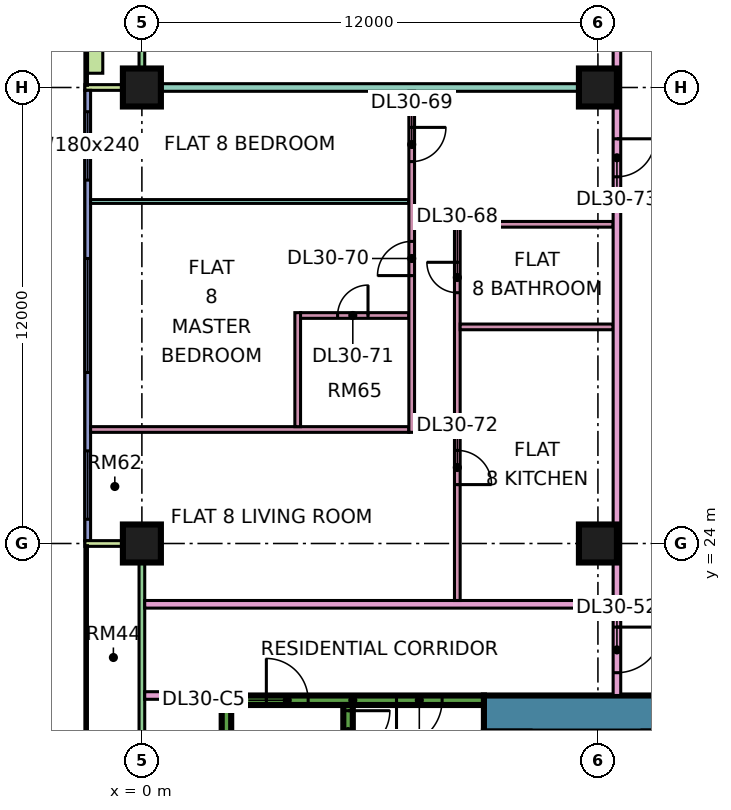
"""IFC4 building model, lengths in metres.
Left out: names, types, materials, properties, quantities, classifications, styles, units other than length and angle.
Written with IfcOpenShell. Run it as: python <this file> out.ifc"""

import sys

from ifc_helpers import new_model, si_unit, direction, frame, frame_2d, origin, origin_2d, place, context, subcontext, project, spatial, rectangle, extrude, element, fill, save


model = new_model("IFC4")
c1 = context("Model", 3, precision=1e-05, world=origin(), true_north=direction((0.0, 1.0)))
c2 = subcontext(c1, "Body", "Model", "MODEL_VIEW")
j1 = project(units=[si_unit("LENGTHUNIT", "METRE"), si_unit("PLANEANGLEUNIT", "RADIAN")], contexts=[c1])
p1 = place(None, origin())
s1 = spatial("IfcSite", under=j1, at=p1, CompositionType="ELEMENT")
p2 = place(p1, origin())
s2 = spatial("IfcBuilding", under=s1, at=p2, CompositionType="ELEMENT")
p3 = place(p2, frame((0.0, 0.0, 129.4)))
s3 = spatial("IfcBuildingStorey", under=s2, at=p3, CompositionType="ELEMENT", Elevation=129.4)
p4 = place(p3, frame((0.0, 24.0, 0.0), z_axis=(0.0, 0.0, 1.0), x_axis=(1.0, 0.0, 0.0)))
e1 = element("IfcColumn", 1, at=p4, inside=s3, PredefinedType="COLUMN", context=c2, shape_type="SweptSolid", body=[
    extrude(rectangle(XDim=1.0, YDim=1.0, at=origin_2d()), origin(), (0.0, 0.0, 1.0), 3.75),
])
p5 = place(p3, frame((0.0, 36.0, 0.0), z_axis=(0.0, 0.0, 1.0), x_axis=(1.0, 0.0, 0.0)))
e2 = element("IfcColumn", 2, at=p5, inside=s3, PredefinedType="COLUMN", context=c2, shape_type="SweptSolid", body=[
    extrude(rectangle(XDim=1.0, YDim=1.0, at=origin_2d()), origin(), (0.0, 0.0, 1.0), 3.75),
])
for number, where, z_axis, x_axis in (
    (3, (12.0, 24.0, 0.0), (0.0, 0.0, 1.0), (1.0, 0.0, 0.0)),
    (4, (12.0, 36.0, 0.0), (0.0, 0.0, 1.0), (1.0, 0.0, 0.0)),
):
    element("IfcColumn", number, at=place(p3, frame(where, z_axis=z_axis, x_axis=x_axis)), inside=s3, PredefinedType="COLUMN", context=c2, shape_type="SweptSolid", body=[
        extrude(rectangle(XDim=1.0, YDim=1.0, at=origin_2d()), origin(), (0.0, 0.0, 1.0), 3.75),
    ])
p6 = place(p3, frame((9.0, 19.525, 0.0), z_axis=(0.0, 0.0, 1.0), x_axis=(1.0, 0.0, 0.0)))
e5 = element("IfcWall", 5, at=p6, inside=s3, PredefinedType="SHEAR", context=c2, shape_type="SweptSolid", body=[
    extrude(rectangle(XDim=25.0, YDim=0.95, at=frame_2d((12.5, 0.0))), origin(), (0.0, 0.0, 1.0), 3.75),
])
p7 = place(p6, frame((19.1, 0.0, 0.0)))
e6 = element("IfcOpeningElement", 6, at=p7, cuts=e5, PredefinedType="OPENING", context=c2, shape_type="SweptSolid", body=[
    extrude(rectangle(XDim=1.8, YDim=2.4, at=frame_2d((0.9, 1.2))), frame((0.0, 0.485, 0.0), z_axis=(0.0, -1.0, 0.0), x_axis=(1.0, 0.0, 0.0)), (0.0, 0.0, 1.0), 0.97),
])
p8 = place(p3, frame((2.1, 19.875, 0.0), z_axis=(0.0, 0.0, 1.0), x_axis=(1.0, 0.0, 0.0)))
e7 = element("IfcWall", 7, at=p8, inside=s3, PredefinedType="SHEAR", context=c2, shape_type="SweptSolid", body=[
    extrude(rectangle(XDim=6.9, YDim=0.25, at=frame_2d((3.45, 0.0))), origin(), (0.0, 0.0, 1.0), 3.75),
])
p9 = place(p8, frame((1.175, 0.0, 0.0)))
e8 = element("IfcOpeningElement", 8, at=p9, cuts=e7, PredefinedType="OPENING", context=c2, shape_type="SweptSolid", body=[
    extrude(rectangle(XDim=1.1, YDim=2.2, at=frame_2d((0.55, 1.1))), frame((0.0, 0.135, 0.0), z_axis=(0.0, -1.0, 0.0), x_axis=(1.0, 0.0, 0.0)), (0.0, 0.0, 1.0), 0.27),
])
p10 = place(p8, frame((4.6, 0.0, 0.0)))
e9 = element("IfcOpeningElement", 9, at=p10, cuts=e7, PredefinedType="OPENING", context=c2, shape_type="SweptSolid", body=[
    extrude(rectangle(XDim=1.2, YDim=2.2, at=frame_2d((0.6, 1.1))), frame((0.0, 0.135, 0.0), z_axis=(0.0, -1.0, 0.0), x_axis=(1.0, 0.0, 0.0)), (0.0, 0.0, 1.0), 0.27),
])
p11 = place(p3, frame((2.225, 13.25, 0.0), z_axis=(0.0, 0.0, 1.0), x_axis=(0.0, 1.0, 0.0)))
e10 = element("IfcWall", 10, at=p11, inside=s3, PredefinedType="SHEAR", context=c2, shape_type="SweptSolid", body=[
    extrude(rectangle(XDim=6.5, YDim=0.25, at=frame_2d((3.25, 0.0))), origin(), (0.0, 0.0, 1.0), 3.75),
])
p12 = place(p3, frame((5.425, 13.25, 0.0), z_axis=(0.0, 0.0, 1.0), x_axis=(0.0, 1.0, 0.0)))
e11 = element("IfcWall", 11, at=p12, inside=s3, PredefinedType="SHEAR", context=c2, shape_type="SweptSolid", body=[
    extrude(rectangle(XDim=6.5, YDim=0.25, at=frame_2d((3.25, 0.0))), origin(), (0.0, 0.0, 1.0), 3.75),
])
p13 = place(p12, frame((5.25, 0.0, 0.0)))
e12 = element("IfcOpeningElement", 12, at=p13, cuts=e11, PredefinedType="OPENING", context=c2, shape_type="SweptSolid", body=[
    extrude(rectangle(XDim=1.1, YDim=2.2, at=frame_2d((0.55, 1.1))), frame((0.0, 0.135, 0.0), z_axis=(0.0, -1.0, 0.0), x_axis=(1.0, 0.0, 0.0)), (0.0, 0.0, 1.0), 0.27),
])
p14 = place(p3, frame((0.0, 47.925, 0.0), z_axis=(0.0, 0.0, 1.0), x_axis=(0.0, -1.0, 0.0)))
e13 = element("IfcWall", 13, at=p14, inside=s3, PredefinedType="SOLIDWALL", context=c2, shape_type="SweptSolid", body=[
    extrude(rectangle(XDim=11.85, YDim=0.15, at=frame_2d((5.925, 0.0))), origin(), (0.0, 0.0, 1.0), 3.35),
])
p15 = place(p14, frame((0.562, 0.0, 0.45)))
e14 = element("IfcOpeningElement", 14, at=p15, cuts=e13, PredefinedType="OPENING", context=c2, shape_type="SweptSolid", body=[
    extrude(rectangle(XDim=1.2, YDim=2.4, at=frame_2d((0.6, 1.2))), frame((0.0, 0.085, 0.0), z_axis=(0.0, -1.0, 0.0), x_axis=(1.0, 0.0, 0.0)), (0.0, 0.0, 1.0), 0.17),
])
p16 = place(p14, frame((4.125, 0.0, 0.0)))
e15 = element("IfcOpeningElement", 15, at=p16, cuts=e13, PredefinedType="OPENING", context=c2, shape_type="SweptSolid", body=[
    extrude(rectangle(XDim=1.2, YDim=2.4, at=frame_2d((0.6, 1.2))), frame((0.0, 0.085, 0.0), z_axis=(0.0, -1.0, 0.0), x_axis=(1.0, 0.0, 0.0)), (0.0, 0.0, 1.0), 0.17),
])
p17 = place(p14, frame((7.125, 0.0, 0.45)))
e16 = element("IfcOpeningElement", 16, at=p17, cuts=e13, PredefinedType="OPENING", context=c2, shape_type="SweptSolid", body=[
    extrude(rectangle(XDim=3.0, YDim=2.4, at=frame_2d((1.5, 1.2))), frame((0.0, 0.085, 0.0), z_axis=(0.0, -1.0, 0.0), x_axis=(1.0, 0.0, 0.0)), (0.0, 0.0, 1.0), 0.17),
])
p18 = place(p3, frame((-1.5, 36.0, 0.0), z_axis=(0.0, 0.0, 1.0), x_axis=(1.0, 0.0, 0.0)))
e17 = element("IfcWall", 17, at=p18, inside=s3, PredefinedType="SOLIDWALL", context=c2, shape_type="SweptSolid", body=[
    extrude(rectangle(XDim=1.5, YDim=0.15, at=frame_2d((0.75, 0.0))), origin(), (0.0, 0.0, 1.0), 3.35),
])
p19 = place(p3, frame((-1.425, 35.925, 0.0), z_axis=(0.0, 0.0, 1.0), x_axis=(0.0, -1.0, 0.0)))
e18 = element("IfcWall", 18, at=p19, inside=s3, PredefinedType="SOLIDWALL", context=c2, shape_type="SweptSolid", body=[
    extrude(rectangle(XDim=11.85, YDim=0.15, at=frame_2d((5.925, 0.0))), origin(), (0.0, 0.0, 1.0), 3.35),
])
p20 = place(p19, frame((0.562, 0.0, 0.45)))
e19 = element("IfcOpeningElement", 19, at=p20, cuts=e18, PredefinedType="OPENING", context=c2, shape_type="SweptSolid", body=[
    extrude(rectangle(XDim=1.8, YDim=2.4, at=frame_2d((0.9, 1.2))), frame((0.0, 0.085, 0.0), z_axis=(0.0, -1.0, 0.0), x_axis=(1.0, 0.0, 0.0)), (0.0, 0.0, 1.0), 0.17),
])
p21 = place(p19, frame((4.425, 0.0, 0.45)))
e20 = element("IfcOpeningElement", 20, at=p21, cuts=e18, PredefinedType="OPENING", context=c2, shape_type="SweptSolid", body=[
    extrude(rectangle(XDim=3.0, YDim=2.4, at=frame_2d((1.5, 1.2))), frame((0.0, 0.085, 0.0), z_axis=(0.0, -1.0, 0.0), x_axis=(1.0, 0.0, 0.0)), (0.0, 0.0, 1.0), 0.17),
])
p22 = place(p19, frame((9.488, 0.0, 0.45)))
e21 = element("IfcOpeningElement", 21, at=p22, cuts=e18, PredefinedType="OPENING", context=c2, shape_type="SweptSolid", body=[
    extrude(rectangle(XDim=1.8, YDim=2.4, at=frame_2d((0.9, 1.2))), frame((0.0, 0.085, 0.0), z_axis=(0.0, -1.0, 0.0), x_axis=(1.0, 0.0, 0.0)), (0.0, 0.0, 1.0), 0.17),
])
p23 = place(p3, frame((0.0, 23.925, 0.0), z_axis=(0.0, 0.0, 1.0), x_axis=(0.0, -1.0, 0.0)))
e22 = element("IfcWall", 22, at=p23, inside=s3, PredefinedType="SOLIDWALL", context=c2, shape_type="SweptSolid", body=[
    extrude(rectangle(XDim=11.35, YDim=0.15, at=frame_2d((5.675, 0.0))), origin(), (0.0, 0.0, 1.0), 3.35),
])
p24 = place(p23, frame((6.738, 0.0, 0.0)))
e23 = element("IfcOpeningElement", 23, at=p24, cuts=e22, PredefinedType="OPENING", context=c2, shape_type="SweptSolid", body=[
    extrude(rectangle(XDim=1.8, YDim=2.4, at=frame_2d((0.9, 1.2))), frame((0.0, 0.085, 0.0), z_axis=(0.0, -1.0, 0.0), x_axis=(1.0, 0.0, 0.0)), (0.0, 0.0, 1.0), 0.17),
])
p25 = place(p3, frame((-1.5, 24.0, 0.0), z_axis=(0.0, 0.0, 1.0), x_axis=(1.0, 0.0, 0.0)))
e24 = element("IfcWall", 24, at=p25, inside=s3, PredefinedType="SOLIDWALL", context=c2, shape_type="SweptSolid", body=[
    extrude(rectangle(XDim=1.5, YDim=0.15, at=frame_2d((0.75, 0.0))), origin(), (0.0, 0.0, 1.0), 3.35),
])
p26 = place(p3, frame((-1.229, 47.625, 0.0), z_axis=(0.0, 0.0, 1.0), x_axis=(0.0, -1.0, 0.0)))
e25 = element("IfcWall", 25, at=p26, inside=s3, PredefinedType="SOLIDWALL", context=c2, shape_type="SweptSolid", body=[
    extrude(rectangle(XDim=11.25, YDim=0.4, at=frame_2d((5.625, 0.0))), origin(), (0.0, 0.0, 1.0), 0.7),
])
p27 = place(p3, frame((-1.351, 33.0, 0.0), z_axis=(0.0, 0.0, 1.0), x_axis=(1.0, 0.0, 0.0)))
e26 = element("IfcWall", 26, at=p27, inside=s3, PredefinedType="PARTITIONING", context=c2, shape_type="SweptSolid", body=[
    extrude(rectangle(XDim=8.376, YDim=0.1, at=frame_2d((4.188, 0.0))), origin(), (0.0, 0.0, 1.0), 3.35),
])
p28 = place(p3, frame((-1.35, 27.0, 0.0), z_axis=(0.0, 0.0, 1.0), x_axis=(1.0, 0.0, 0.0)))
e27 = element("IfcWall", 27, at=p28, inside=s3, PredefinedType="PARTITIONING", context=c2, shape_type="SweptSolid", body=[
    extrude(rectangle(XDim=8.375, YDim=0.15, at=frame_2d((4.188, 0.0))), origin(), (0.0, 0.0, 1.0), 3.35),
])
e28 = element("IfcWall", 28, at=p5, inside=s3, PredefinedType="PARTITIONING", context=c2, shape_type="SweptSolid", body=[
    extrude(rectangle(XDim=12.4, YDim=0.2, at=frame_2d((6.2, 0.0))), origin(), (0.0, 0.0, 1.0), 3.35),
])
p29 = place(p3, frame((0.074, 20.0, 0.0), z_axis=(0.0, 0.0, 1.0), x_axis=(1.0, 0.0, 0.0)))
e29 = element("IfcWall", 29, at=p29, inside=s3, PredefinedType="PARTITIONING", context=c2, shape_type="SweptSolid", body=[
    extrude(rectangle(XDim=2.026, YDim=0.2, at=frame_2d((1.013, 0.0))), origin(), (0.0, 0.0, 1.0), 3.35),
])
p30 = place(p3, frame((0.074, 22.4, 0.0), z_axis=(0.0, 0.0, 1.0), x_axis=(1.0, 0.0, 0.0)))
e30 = element("IfcWall", 30, at=p30, inside=s3, PredefinedType="PARTITIONING", context=c2, shape_type="SweptSolid", body=[
    extrude(rectangle(XDim=12.326, YDim=0.2, at=frame_2d((6.163, 0.0))), origin(), (0.0, 0.0, 1.0), 3.35),
])
p31 = place(p3, frame((4.1, 27.075, 0.0), z_axis=(0.0, 0.0, 1.0), x_axis=(0.0, 1.0, 0.0)))
e31 = element("IfcWall", 31, at=p31, inside=s3, PredefinedType="PARTITIONING", context=c2, shape_type="SweptSolid", body=[
    extrude(rectangle(XDim=3.0, YDim=0.15, at=frame_2d((1.5, 0.0))), origin(), (0.0, 0.0, 1.0), 3.35),
])
p32 = place(p3, frame((4.175, 30.0, 0.0), z_axis=(0.0, 0.0, 1.0), x_axis=(1.0, 0.0, 0.0)))
e32 = element("IfcWall", 32, at=p32, inside=s3, PredefinedType="PARTITIONING", context=c2, shape_type="SweptSolid", body=[
    extrude(rectangle(XDim=2.85, YDim=0.15, at=frame_2d((1.425, 0.0))), origin(), (0.0, 0.0, 1.0), 3.35),
])
p33 = place(p32, frame((0.975, 0.0, 0.0)))
e33 = element("IfcOpeningElement", 33, at=p33, cuts=e32, PredefinedType="OPENING", context=c2, shape_type="SweptSolid", body=[
    extrude(rectangle(XDim=0.8, YDim=2.1, at=frame_2d((0.4, 1.05))), frame((0.0, 0.085, 0.0), z_axis=(0.0, -1.0, 0.0), x_axis=(1.0, 0.0, 0.0)), (0.0, 0.0, 1.0), 0.17),
])
p34 = place(p3, frame((7.1, 26.925, 0.0), z_axis=(0.0, 0.0, 1.0), x_axis=(0.0, 1.0, 0.0)))
e34 = element("IfcWall", 34, at=p34, inside=s3, PredefinedType="PARTITIONING", context=c2, shape_type="SweptSolid", body=[
    extrude(rectangle(XDim=8.975, YDim=0.15, at=frame_2d((4.487, 0.0))), origin(), (0.0, 0.0, 1.0), 3.35),
])
p35 = place(p34, frame((7.125, 0.0, 0.0)))
e35 = element("IfcOpeningElement", 35, at=p35, cuts=e34, PredefinedType="OPENING", context=c2, shape_type="SweptSolid", body=[
    extrude(rectangle(XDim=0.9, YDim=2.1, at=frame_2d((0.45, 1.05))), frame((0.0, 0.085, 0.0), z_axis=(0.0, -1.0, 0.0), x_axis=(1.0, 0.0, 0.0)), (0.0, 0.0, 1.0), 0.17),
])
p36 = place(p34, frame((4.125, 0.0, 0.0)))
e36 = element("IfcOpeningElement", 36, at=p36, cuts=e34, PredefinedType="OPENING", context=c2, shape_type="SweptSolid", body=[
    extrude(rectangle(XDim=0.9, YDim=2.1, at=frame_2d((0.45, 1.05))), frame((0.0, 0.085, 0.0), z_axis=(0.0, -1.0, 0.0), x_axis=(1.0, 0.0, 0.0)), (0.0, 0.0, 1.0), 0.17),
])
p37 = place(p3, frame((8.3, 22.5, 0.0), z_axis=(0.0, 0.0, 1.0), x_axis=(0.0, 1.0, 0.0)))
e37 = element("IfcWall", 37, at=p37, inside=s3, PredefinedType="PARTITIONING", context=c2, shape_type="SweptSolid", body=[
    extrude(rectangle(XDim=9.975, YDim=0.15, at=frame_2d((4.988, 0.0))), origin(), (0.0, 0.0, 1.0), 3.35),
])
p38 = place(p37, frame((8.1, 0.0, 0.0)))
e38 = element("IfcOpeningElement", 38, at=p38, cuts=e37, PredefinedType="OPENING", context=c2, shape_type="SweptSolid", body=[
    extrude(rectangle(XDim=0.8, YDim=2.1, at=frame_2d((0.4, 1.05))), frame((0.0, 0.085, 0.0), z_axis=(0.0, -1.0, 0.0), x_axis=(1.0, 0.0, 0.0)), (0.0, 0.0, 1.0), 0.17),
])
p39 = place(p37, frame((3.05, 0.0, 0.0)))
e39 = element("IfcOpeningElement", 39, at=p39, cuts=e37, PredefinedType="OPENING", context=c2, shape_type="SweptSolid", body=[
    extrude(rectangle(XDim=0.9, YDim=2.1, at=frame_2d((0.45, 1.05))), frame((0.0, 0.085, 0.0), z_axis=(0.0, -1.0, 0.0), x_axis=(1.0, 0.0, 0.0)), (0.0, 0.0, 1.0), 0.17),
])
for number, where, z_axis, x_axis in (
    (40, (8.375, 29.7, 0.0), (0.0, 0.0, 1.0), (1.0, 0.0, 0.0)),
    (41, (8.375, 32.4, 0.0), (0.0, 0.0, 1.0), (1.0, 0.0, 0.0)),
):
    element("IfcWall", number, at=place(p3, frame(where, z_axis=z_axis, x_axis=x_axis)), inside=s3, PredefinedType="PARTITIONING", context=c2, shape_type="SweptSolid", body=[
        extrude(rectangle(XDim=4.025, YDim=0.15, at=frame_2d((2.012, 0.0))), origin(), (0.0, 0.0, 1.0), 3.35),
    ])
p40 = place(p3, frame((12.5, 20.0, 0.0), z_axis=(0.0, 0.0, 1.0), x_axis=(0.0, 1.0, 0.0)))
e42 = element("IfcWall", 42, at=p40, inside=s3, PredefinedType="PARTITIONING", context=c2, shape_type="SweptSolid", body=[
    extrude(rectangle(XDim=42.926, YDim=0.2, at=frame_2d((21.463, 0.0))), origin(), (0.0, 0.0, 1.0), 3.35),
])
p41 = place(p40, frame((17.25, 0.0, 0.0)))
e43 = element("IfcOpeningElement", 43, at=p41, cuts=e42, PredefinedType="OPENING", context=c2, shape_type="SweptSolid", body=[
    extrude(rectangle(XDim=1.0, YDim=2.1, at=frame_2d((0.5, 1.05))), frame((0.0, 0.11, 0.0), z_axis=(0.0, -1.0, 0.0), x_axis=(1.0, 0.0, 0.0)), (0.0, 0.0, 1.0), 0.22),
])
p42 = place(p40, frame((40.8, 0.0, 0.0)))
e44 = element("IfcOpeningElement", 44, at=p42, cuts=e42, PredefinedType="OPENING", context=c2, shape_type="SweptSolid", body=[
    extrude(rectangle(XDim=1.0, YDim=2.1, at=frame_2d((0.5, 1.05))), frame((0.0, 0.11, 0.0), z_axis=(0.0, -1.0, 0.0), x_axis=(1.0, 0.0, 0.0)), (0.0, 0.0, 1.0), 0.22),
])
p43 = place(p40, frame((0.6, 0.0, 0.0)))
e45 = element("IfcOpeningElement", 45, at=p43, cuts=e42, PredefinedType="OPENING", context=c2, shape_type="SweptSolid", body=[
    extrude(rectangle(XDim=1.2, YDim=2.1, at=frame_2d((0.6, 1.05))), frame((0.0, 0.11, 0.0), z_axis=(0.0, -1.0, 0.0), x_axis=(1.0, 0.0, 0.0)), (0.0, 0.0, 1.0), 0.22),
])
p44 = place(p40, frame((13.65, 0.0, 0.0)))
e46 = element("IfcOpeningElement", 46, at=p44, cuts=e42, PredefinedType="OPENING", context=c2, shape_type="SweptSolid", body=[
    extrude(rectangle(XDim=1.0, YDim=2.1, at=frame_2d((0.5, 1.05))), frame((0.0, 0.11, 0.0), z_axis=(0.0, -1.0, 0.0), x_axis=(1.0, 0.0, 0.0)), (0.0, 0.0, 1.0), 0.22),
])
p45 = place(p20, origin())
e47 = element("IfcWindow", 47, at=p45, inside=s3, PartitioningType="SINGLE_PANEL", PredefinedType="WINDOW", context=c2, shape_type="SweptSolid", body=[
    extrude(rectangle(XDim=1.8, YDim=2.4, at=frame_2d((0.9, 1.2))), frame((0.0, 0.03, 0.0), z_axis=(0.0, -1.0, 0.0), x_axis=(1.0, 0.0, 0.0)), (0.0, 0.0, 1.0), 0.06),
])
fill(e19, e47)
p46 = place(p21, origin())
e48 = element("IfcWindow", 48, at=p46, inside=s3, PartitioningType="SINGLE_PANEL", PredefinedType="WINDOW", context=c2, shape_type="SweptSolid", body=[
    extrude(rectangle(XDim=3.0, YDim=2.4, at=frame_2d((1.5, 1.2))), frame((0.0, 0.03, 0.0), z_axis=(0.0, -1.0, 0.0), x_axis=(1.0, 0.0, 0.0)), (0.0, 0.0, 1.0), 0.06),
])
fill(e20, e48)
p47 = place(p22, origin())
e49 = element("IfcWindow", 49, at=p47, inside=s3, PartitioningType="SINGLE_PANEL", PredefinedType="WINDOW", context=c2, shape_type="SweptSolid", body=[
    extrude(rectangle(XDim=1.8, YDim=2.4, at=frame_2d((0.9, 1.2))), frame((0.0, 0.03, 0.0), z_axis=(0.0, -1.0, 0.0), x_axis=(1.0, 0.0, 0.0)), (0.0, 0.0, 1.0), 0.06),
])
fill(e21, e49)
p48 = place(p13, origin())
e50 = element("IfcDoor", 50, at=p48, inside=s3, OperationType="SINGLE_SWING_RIGHT", PredefinedType="DOOR", context=c2, shape_type="SweptSolid", body=[
    extrude(rectangle(XDim=1.1, YDim=2.2, at=frame_2d((0.55, 1.1))), frame((0.0, 0.025, 0.0), z_axis=(0.0, -1.0, 0.0), x_axis=(1.0, 0.0, 0.0)), (0.0, 0.0, 1.0), 0.05),
])
fill(e12, e50)
p49 = place(p9, origin())
e51 = element("IfcDoor", 51, at=p49, inside=s3, OperationType="SINGLE_SWING_LEFT", PredefinedType="DOOR", context=c2, shape_type="SweptSolid", body=[
    extrude(rectangle(XDim=1.1, YDim=2.2, at=frame_2d((0.55, 1.1))), frame((0.0, 0.025, 0.0), z_axis=(0.0, -1.0, 0.0), x_axis=(1.0, 0.0, 0.0)), (0.0, 0.0, 1.0), 0.05),
])
fill(e8, e51)
p50 = place(p10, frame((1.2, 0.0, 0.0), z_axis=(0.0, 0.0, 1.0), x_axis=(-1.0, 0.0, 0.0)))
e52 = element("IfcDoor", 52, at=p50, inside=s3, OperationType="SINGLE_SWING_LEFT", PredefinedType="DOOR", context=c2, shape_type="SweptSolid", body=[
    extrude(rectangle(XDim=1.2, YDim=2.2, at=frame_2d((0.6, 1.1))), frame((0.0, 0.025, 0.0), z_axis=(0.0, -1.0, 0.0), x_axis=(1.0, 0.0, 0.0)), (0.0, 0.0, 1.0), 0.05),
])
fill(e9, e52)
p51 = place(p43, origin())
e53 = element("IfcDoor", 53, at=p51, inside=s3, OperationType="SINGLE_SWING_RIGHT", PredefinedType="DOOR", context=c2, shape_type="SweptSolid", body=[
    extrude(rectangle(XDim=1.2, YDim=2.1, at=frame_2d((0.6, 1.05))), frame((0.0, 0.025, 0.0), z_axis=(0.0, -1.0, 0.0), x_axis=(1.0, 0.0, 0.0)), (0.0, 0.0, 1.0), 0.05),
])
fill(e45, e53)
p52 = place(p38, frame((0.8, 0.0, 0.0), z_axis=(0.0, 0.0, 1.0), x_axis=(-1.0, 0.0, 0.0)))
e54 = element("IfcDoor", 54, at=p52, inside=s3, OperationType="SINGLE_SWING_RIGHT", PredefinedType="DOOR", context=c2, shape_type="SweptSolid", body=[
    extrude(rectangle(XDim=0.8, YDim=2.1, at=frame_2d((0.4, 1.05))), frame((0.0, 0.025, 0.0), z_axis=(0.0, -1.0, 0.0), x_axis=(1.0, 0.0, 0.0)), (0.0, 0.0, 1.0), 0.05),
])
fill(e38, e54)
p53 = place(p35, origin())
e55 = element("IfcDoor", 55, at=p53, inside=s3, OperationType="SINGLE_SWING_RIGHT", PredefinedType="DOOR", context=c2, shape_type="SweptSolid", body=[
    extrude(rectangle(XDim=0.9, YDim=2.1, at=frame_2d((0.45, 1.05))), frame((0.0, 0.025, 0.0), z_axis=(0.0, -1.0, 0.0), x_axis=(1.0, 0.0, 0.0)), (0.0, 0.0, 1.0), 0.05),
])
fill(e35, e55)
p54 = place(p36, origin())
e56 = element("IfcDoor", 56, at=p54, inside=s3, OperationType="SINGLE_SWING_LEFT", PredefinedType="DOOR", context=c2, shape_type="SweptSolid", body=[
    extrude(rectangle(XDim=0.9, YDim=2.1, at=frame_2d((0.45, 1.05))), frame((0.0, 0.025, 0.0), z_axis=(0.0, -1.0, 0.0), x_axis=(1.0, 0.0, 0.0)), (0.0, 0.0, 1.0), 0.05),
])
fill(e36, e56)
p55 = place(p33, frame((0.8, 0.0, 0.0), z_axis=(0.0, 0.0, 1.0), x_axis=(-1.0, 0.0, 0.0)))
e57 = element("IfcDoor", 57, at=p55, inside=s3, OperationType="SINGLE_SWING_RIGHT", PredefinedType="DOOR", context=c2, shape_type="SweptSolid", body=[
    extrude(rectangle(XDim=0.8, YDim=2.1, at=frame_2d((0.4, 1.05))), frame((0.0, 0.025, 0.0), z_axis=(0.0, -1.0, 0.0), x_axis=(1.0, 0.0, 0.0)), (0.0, 0.0, 1.0), 0.05),
])
fill(e33, e57)
p56 = place(p39, frame((0.9, 0.0, 0.0), z_axis=(0.0, 0.0, 1.0), x_axis=(-1.0, 0.0, 0.0)))
e58 = element("IfcDoor", 58, at=p56, inside=s3, OperationType="SINGLE_SWING_LEFT", PredefinedType="DOOR", context=c2, shape_type="SweptSolid", body=[
    extrude(rectangle(XDim=0.9, YDim=2.1, at=frame_2d((0.45, 1.05))), frame((0.0, 0.025, 0.0), z_axis=(0.0, -1.0, 0.0), x_axis=(1.0, 0.0, 0.0)), (0.0, 0.0, 1.0), 0.05),
])
fill(e39, e58)
p57 = place(p44, origin())
e59 = element("IfcDoor", 59, at=p57, inside=s3, OperationType="SINGLE_SWING_RIGHT", PredefinedType="DOOR", context=c2, shape_type="SweptSolid", body=[
    extrude(rectangle(XDim=1.0, YDim=2.1, at=frame_2d((0.5, 1.05))), frame((0.0, 0.025, 0.0), z_axis=(0.0, -1.0, 0.0), x_axis=(1.0, 0.0, 0.0)), (0.0, 0.0, 1.0), 0.05),
])
fill(e46, e59)
save(model, sys.argv[1])
